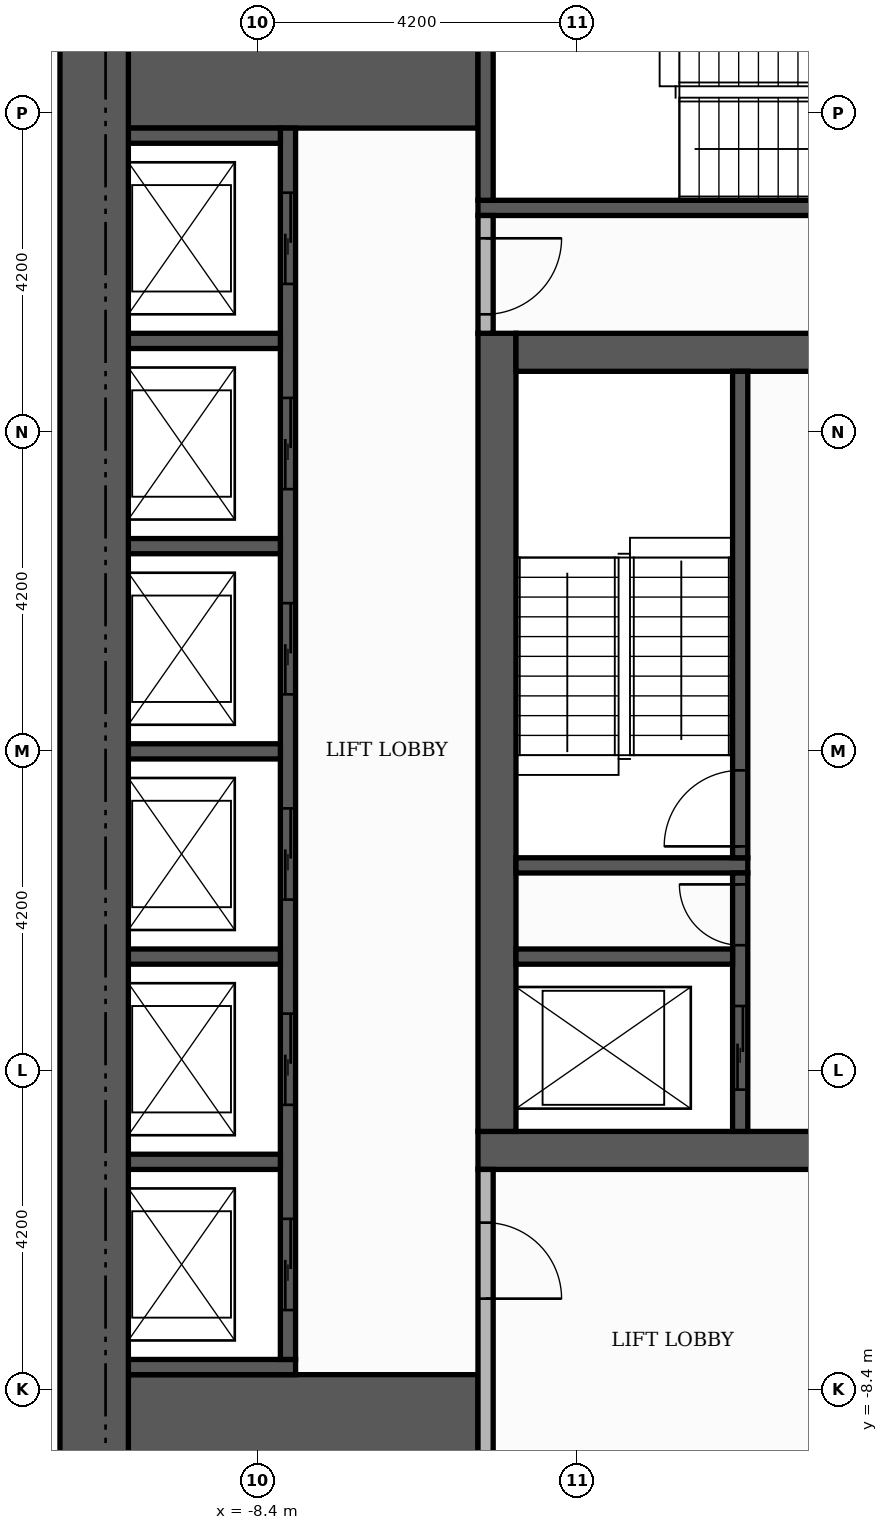
"""IFC4 building model, lengths in metres.
Left out: names, types, materials, properties, quantities, classifications, styles, units other than length and angle.
Written with IfcOpenShell. Run it as: python <this file> out.ifc"""

import sys

from ifc_helpers import new_model, si_unit, direction, frame, frame_2d, origin, place, context, subcontext, project, spatial, rectangle, extrude, element, fill, save


model = new_model("IFC4")
c1 = context("Model", 3, precision=1e-05, world=origin(), true_north=direction((0.0, 1.0)))
c2 = subcontext(c1, "Body", "Model", "MODEL_VIEW")
j1 = project(units=[si_unit("LENGTHUNIT", "METRE"), si_unit("PLANEANGLEUNIT", "RADIAN")], contexts=[c1])
p1 = place(None, origin())
s1 = spatial("IfcSite", under=j1, at=p1, CompositionType="ELEMENT")
p2 = place(p1, origin())
s2 = spatial("IfcBuilding", under=s1, at=p2, CompositionType="ELEMENT")
p3 = place(p2, frame((0.0, 0.0, 27.0)))
s3 = spatial("IfcBuildingStorey", under=s2, at=p3, CompositionType="ELEMENT", Elevation=27.0)
p4 = place(p3, frame((-5.5, -5.25, 0.0), z_axis=(0.0, 0.0, 1.0), x_axis=(1.0, 0.0, 0.0)))
e1 = element("IfcWall", 1, at=p4, inside=s3, PredefinedType="SHEAR", context=c2, shape_type="SweptSolid", body=[
    extrude(rectangle(XDim=11.0, YDim=0.5, at=frame_2d((5.5, 0.0))), origin(), (0.0, 0.0, 1.0), 3.48),
])
p5 = place(p4, frame((4.9, 0.0, 0.0)))
e2 = element("IfcOpeningElement", 2, at=p5, cuts=e1, PredefinedType="OPENING", context=c2, shape_type="SweptSolid", body=[
    extrude(rectangle(XDim=1.2, YDim=2.1, at=frame_2d((0.6, 1.05))), frame((0.0, 0.26, 0.0), z_axis=(0.0, -1.0, 0.0), x_axis=(1.0, 0.0, 0.0)), (0.0, 0.0, 1.0), 0.52),
])
p6 = place(p3, frame((-5.25, -5.0, 0.0), z_axis=(0.0, 0.0, 1.0), x_axis=(0.0, 1.0, 0.0)))
e3 = element("IfcWall", 3, at=p6, inside=s3, PredefinedType="SHEAR", context=c2, shape_type="SweptSolid", body=[
    extrude(rectangle(XDim=10.5, YDim=0.5, at=frame_2d((5.25, 0.0))), origin(), (0.0, 0.0, 1.0), 3.48),
])
p7 = place(p3, frame((-5.0, 5.25, 0.0), z_axis=(0.0, 0.0, 1.0), x_axis=(1.0, 0.0, 0.0)))
e4 = element("IfcWall", 4, at=p7, inside=s3, PredefinedType="SHEAR", context=c2, shape_type="SweptSolid", body=[
    extrude(rectangle(XDim=10.0, YDim=0.5, at=frame_2d((5.0, 0.0))), origin(), (0.0, 0.0, 1.0), 3.48),
])
p8 = place(p7, frame((4.4, 0.0, 0.0)))
e5 = element("IfcOpeningElement", 5, at=p8, cuts=e4, PredefinedType="OPENING", context=c2, shape_type="SweptSolid", body=[
    extrude(rectangle(XDim=1.2, YDim=2.1, at=frame_2d((0.6, 1.05))), frame((0.0, 0.26, 0.0), z_axis=(0.0, -1.0, 0.0), x_axis=(1.0, 0.0, 0.0)), (0.0, 0.0, 1.0), 0.52),
])
for number, where, z_axis, x_axis in (
    (6, (-10.1, -9.15, 0.0), (0.0, 0.0, 1.0), (1.0, 0.0, 0.0)),
    (7, (-10.1, 9.15, 0.0), (0.0, 0.0, 1.0), (1.0, 0.0, 0.0)),
):
    element("IfcWall", number, at=place(p3, frame(where, z_axis=z_axis, x_axis=x_axis)), inside=s3, PredefinedType="SHEAR", context=c2, shape_type="SweptSolid", body=[
        extrude(rectangle(XDim=4.6, YDim=1.9, at=frame_2d((2.3, 0.0))), origin(), (0.0, 0.0, 1.0), 3.48),
    ])
p9 = place(p3, frame((-5.0, -1.5, 0.0), z_axis=(0.0, 0.0, 1.0), x_axis=(1.0, 0.0, 0.0)))
e8 = element("IfcWall", 8, at=p9, inside=s3, PredefinedType="SHEAR", context=c2, shape_type="SweptSolid", body=[
    extrude(rectangle(XDim=3.05, YDim=0.2, at=frame_2d((1.525, 0.0))), origin(), (0.0, 0.0, 1.0), 3.48),
])
p10 = place(p3, frame((-2.05, -1.4, 0.0), z_axis=(0.0, 0.0, 1.0), x_axis=(0.0, 1.0, 0.0)))
e9 = element("IfcWall", 9, at=p10, inside=s3, PredefinedType="SHEAR", context=c2, shape_type="SweptSolid", body=[
    extrude(rectangle(XDim=6.4, YDim=0.2, at=frame_2d((3.2, 0.0))), origin(), (0.0, 0.0, 1.0), 3.48),
])
p11 = place(p10, frame((0.15, 0.0, 0.0)))
e10 = element("IfcOpeningElement", 10, at=p11, cuts=e9, PredefinedType="OPENING", context=c2, shape_type="SweptSolid", body=[
    extrude(rectangle(XDim=1.0, YDim=2.1, at=frame_2d((0.5, 1.05))), frame((0.0, 0.11, 0.0), z_axis=(0.0, -1.0, 0.0), x_axis=(1.0, 0.0, 0.0)), (0.0, 0.0, 1.0), 0.22),
])
p12 = place(p3, frame((-5.5, 7.15, 0.0), z_axis=(0.0, 0.0, 1.0), x_axis=(1.0, 0.0, 0.0)))
e11 = element("IfcWall", 11, at=p12, inside=s3, PredefinedType="SHEAR", context=c2, shape_type="SweptSolid", body=[
    extrude(rectangle(XDim=6.8, YDim=0.2, at=frame_2d((3.4, 0.0))), origin(), (0.0, 0.0, 1.0), 3.48),
])
p13 = place(p3, frame((-5.4, 7.25, 0.0), z_axis=(0.0, 0.0, 1.0), x_axis=(0.0, 1.0, 0.0)))
e12 = element("IfcWall", 12, at=p13, inside=s3, PredefinedType="SHEAR", context=c2, shape_type="SweptSolid", body=[
    extrude(rectangle(XDim=2.85, YDim=0.2, at=frame_2d((1.425, 0.0))), origin(), (0.0, 0.0, 1.0), 3.48),
])
p14 = place(p3, frame((-10.1, -8.1, 0.0), z_axis=(0.0, 0.0, 1.0), x_axis=(1.0, 0.0, 0.0)))
e13 = element("IfcWall", 13, at=p14, inside=s3, PredefinedType="SHEAR", context=c2, shape_type="SweptSolid", body=[
    extrude(rectangle(XDim=2.2, YDim=0.2, at=frame_2d((1.1, 0.0))), origin(), (0.0, 0.0, 1.0), 3.48),
])
p15 = place(p3, frame((-8.0, -8.0, 0.0), z_axis=(0.0, 0.0, 1.0), x_axis=(0.0, 1.0, 0.0)))
e14 = element("IfcWall", 14, at=p15, inside=s3, PredefinedType="SHEAR", context=c2, shape_type="SweptSolid", body=[
    extrude(rectangle(XDim=16.2, YDim=0.2, at=frame_2d((8.1, 0.0))), origin(), (0.0, 0.0, 1.0), 3.48),
])
p16 = place(p15, frame((0.65, 0.0, 0.0)))
e15 = element("IfcOpeningElement", 15, at=p16, cuts=e14, PredefinedType="OPENING", context=c2, shape_type="SweptSolid", body=[
    extrude(rectangle(XDim=1.2, YDim=2.1, at=frame_2d((0.6, 1.05))), frame((0.0, 0.11, 0.0), z_axis=(0.0, -1.0, 0.0), x_axis=(1.0, 0.0, 0.0)), (0.0, 0.0, 1.0), 0.22),
])
p17 = place(p15, frame((3.35, 0.0, 0.0)))
e16 = element("IfcOpeningElement", 16, at=p17, cuts=e14, PredefinedType="OPENING", context=c2, shape_type="SweptSolid", body=[
    extrude(rectangle(XDim=1.2, YDim=2.1, at=frame_2d((0.6, 1.05))), frame((0.0, 0.11, 0.0), z_axis=(0.0, -1.0, 0.0), x_axis=(1.0, 0.0, 0.0)), (0.0, 0.0, 1.0), 0.22),
])
p18 = place(p15, frame((6.05, 0.0, 0.0)))
e17 = element("IfcOpeningElement", 17, at=p18, cuts=e14, PredefinedType="OPENING", context=c2, shape_type="SweptSolid", body=[
    extrude(rectangle(XDim=1.2, YDim=2.1, at=frame_2d((0.6, 1.05))), frame((0.0, 0.11, 0.0), z_axis=(0.0, -1.0, 0.0), x_axis=(1.0, 0.0, 0.0)), (0.0, 0.0, 1.0), 0.22),
])
p19 = place(p15, frame((8.75, 0.0, 0.0)))
e18 = element("IfcOpeningElement", 18, at=p19, cuts=e14, PredefinedType="OPENING", context=c2, shape_type="SweptSolid", body=[
    extrude(rectangle(XDim=1.2, YDim=2.1, at=frame_2d((0.6, 1.05))), frame((0.0, 0.11, 0.0), z_axis=(0.0, -1.0, 0.0), x_axis=(1.0, 0.0, 0.0)), (0.0, 0.0, 1.0), 0.22),
])
p20 = place(p15, frame((11.45, 0.0, 0.0)))
e19 = element("IfcOpeningElement", 19, at=p20, cuts=e14, PredefinedType="OPENING", context=c2, shape_type="SweptSolid", body=[
    extrude(rectangle(XDim=1.2, YDim=2.1, at=frame_2d((0.6, 1.05))), frame((0.0, 0.11, 0.0), z_axis=(0.0, -1.0, 0.0), x_axis=(1.0, 0.0, 0.0)), (0.0, 0.0, 1.0), 0.22),
])
p21 = place(p15, frame((14.15, 0.0, 0.0)))
e20 = element("IfcOpeningElement", 20, at=p21, cuts=e14, PredefinedType="OPENING", context=c2, shape_type="SweptSolid", body=[
    extrude(rectangle(XDim=1.2, YDim=2.1, at=frame_2d((0.6, 1.05))), frame((0.0, 0.11, 0.0), z_axis=(0.0, -1.0, 0.0), x_axis=(1.0, 0.0, 0.0)), (0.0, 0.0, 1.0), 0.22),
])
p22 = place(p3, frame((-10.1, -5.4, 0.0), z_axis=(0.0, 0.0, 1.0), x_axis=(1.0, 0.0, 0.0)))
e21 = element("IfcWall", 21, at=p22, inside=s3, PredefinedType="SHEAR", context=c2, shape_type="SweptSolid", body=[
    extrude(rectangle(XDim=2.0, YDim=0.2, at=frame_2d((1.0, 0.0))), origin(), (0.0, 0.0, 1.0), 3.48),
])
p23 = place(p3, frame((-2.05, -5.0, 0.0), z_axis=(0.0, 0.0, 1.0), x_axis=(0.0, 1.0, 0.0)))
e22 = element("IfcWall", 22, at=p23, inside=s3, PredefinedType="SHEAR", context=c2, shape_type="SweptSolid", body=[
    extrude(rectangle(XDim=3.4, YDim=0.2, at=frame_2d((1.7, 0.0))), origin(), (0.0, 0.0, 1.0), 3.48),
])
p24 = place(p23, frame((0.55, 0.0, 0.0)))
e23 = element("IfcOpeningElement", 23, at=p24, cuts=e22, PredefinedType="OPENING", context=c2, shape_type="SweptSolid", body=[
    extrude(rectangle(XDim=1.1, YDim=2.1, at=frame_2d((0.55, 1.05))), frame((0.0, 0.11, 0.0), z_axis=(0.0, -1.0, 0.0), x_axis=(1.0, 0.0, 0.0)), (0.0, 0.0, 1.0), 0.22),
])
p25 = place(p23, frame((2.45, 0.0, 0.0)))
e24 = element("IfcOpeningElement", 24, at=p25, cuts=e22, PredefinedType="OPENING", context=c2, shape_type="SweptSolid", body=[
    extrude(rectangle(XDim=0.8, YDim=2.1, at=frame_2d((0.4, 1.05))), frame((0.0, 0.11, 0.0), z_axis=(0.0, -1.0, 0.0), x_axis=(1.0, 0.0, 0.0)), (0.0, 0.0, 1.0), 0.22),
])
p26 = place(p3, frame((-10.1, -2.7, 0.0), z_axis=(0.0, 0.0, 1.0), x_axis=(1.0, 0.0, 0.0)))
e25 = element("IfcWall", 25, at=p26, inside=s3, PredefinedType="SHEAR", context=c2, shape_type="SweptSolid", body=[
    extrude(rectangle(XDim=2.0, YDim=0.2, at=frame_2d((1.0, 0.0))), origin(), (0.0, 0.0, 1.0), 3.48),
])
p27 = place(p3, frame((-5.0, -2.7, 0.0), z_axis=(0.0, 0.0, 1.0), x_axis=(1.0, 0.0, 0.0)))
e26 = element("IfcWall", 26, at=p27, inside=s3, PredefinedType="SHEAR", context=c2, shape_type="SweptSolid", body=[
    extrude(rectangle(XDim=2.85, YDim=0.2, at=frame_2d((1.425, 0.0))), origin(), (0.0, 0.0, 1.0), 3.48),
])
for number, where, z_axis, x_axis in (
    (27, (-10.1, 0.0, 0.0), (0.0, 0.0, 1.0), (1.0, 0.0, 0.0)),
    (28, (-10.1, 2.7, 0.0), (0.0, 0.0, 1.0), (1.0, 0.0, 0.0)),
    (29, (-10.1, 5.4, 0.0), (0.0, 0.0, 1.0), (1.0, 0.0, 0.0)),
    (30, (-10.1, 8.1, 0.0), (0.0, 0.0, 1.0), (1.0, 0.0, 0.0)),
):
    element("IfcWall", number, at=place(p3, frame(where, z_axis=z_axis, x_axis=x_axis)), inside=s3, PredefinedType="SHEAR", context=c2, shape_type="SweptSolid", body=[
        extrude(rectangle(XDim=2.0, YDim=0.2, at=frame_2d((1.0, 0.0))), origin(), (0.0, 0.0, 1.0), 3.48),
    ])
p28 = place(p3, frame((-10.55, -10.1, 0.0), z_axis=(0.0, 0.0, 1.0), x_axis=(0.0, 1.0, 0.0)))
e31 = element("IfcWall", 31, at=p28, inside=s3, PredefinedType="SHEAR", context=c2, shape_type="SweptSolid", body=[
    extrude(rectangle(XDim=20.2, YDim=0.9, at=frame_2d((10.1, 0.0))), origin(), (0.0, 0.0, 1.0), 3.48),
])
p29 = place(p3, frame((-5.4, -10.1, 0.0), z_axis=(0.0, 0.0, 1.0), x_axis=(0.0, 1.0, 0.0)))
e32 = element("IfcWall", 32, at=p29, inside=s3, PredefinedType="PARTITIONING", context=c2, shape_type="SweptSolid", body=[
    extrude(rectangle(XDim=4.6, YDim=0.2, at=frame_2d((2.3, 0.0))), origin(), (0.0, 0.0, 1.0), 3.48),
])
p30 = place(p29, frame((2.9, 0.0, 0.0)))
e33 = element("IfcOpeningElement", 33, at=p30, cuts=e32, PredefinedType="OPENING", context=c2, shape_type="SweptSolid", body=[
    extrude(rectangle(XDim=1.0, YDim=2.1, at=frame_2d((0.5, 1.05))), frame((0.0, 0.11, 0.0), z_axis=(0.0, -1.0, 0.0), x_axis=(1.0, 0.0, 0.0)), (0.0, 0.0, 1.0), 0.22),
])
p31 = place(p3, frame((-5.4, 5.5, 0.0), z_axis=(0.0, 0.0, 1.0), x_axis=(0.0, 1.0, 0.0)))
e34 = element("IfcWall", 34, at=p31, inside=s3, PredefinedType="PARTITIONING", context=c2, shape_type="SweptSolid", body=[
    extrude(rectangle(XDim=1.55, YDim=0.2, at=frame_2d((0.775, 0.0))), origin(), (0.0, 0.0, 1.0), 3.48),
])
p32 = place(p31, frame((0.25, 0.0, 0.0)))
e35 = element("IfcOpeningElement", 35, at=p32, cuts=e34, PredefinedType="OPENING", context=c2, shape_type="SweptSolid", body=[
    extrude(rectangle(XDim=1.0, YDim=2.1, at=frame_2d((0.5, 1.05))), frame((0.0, 0.11, 0.0), z_axis=(0.0, -1.0, 0.0), x_axis=(1.0, 0.0, 0.0)), (0.0, 0.0, 1.0), 0.22),
])
p33 = place(p16, origin())
e36 = element("IfcDoor", 36, at=p33, inside=s3, OperationType="SLIDING_TO_LEFT", PredefinedType="DOOR", context=c2, shape_type="SweptSolid", body=[
    extrude(rectangle(XDim=1.2, YDim=2.1, at=frame_2d((0.6, 1.05))), frame((0.0, 0.025, 0.0), z_axis=(0.0, -1.0, 0.0), x_axis=(1.0, 0.0, 0.0)), (0.0, 0.0, 1.0), 0.05),
])
fill(e15, e36)
p34 = place(p17, origin())
e37 = element("IfcDoor", 37, at=p34, inside=s3, OperationType="SLIDING_TO_LEFT", PredefinedType="DOOR", context=c2, shape_type="SweptSolid", body=[
    extrude(rectangle(XDim=1.2, YDim=2.1, at=frame_2d((0.6, 1.05))), frame((0.0, 0.025, 0.0), z_axis=(0.0, -1.0, 0.0), x_axis=(1.0, 0.0, 0.0)), (0.0, 0.0, 1.0), 0.05),
])
fill(e16, e37)
p35 = place(p18, origin())
e38 = element("IfcDoor", 38, at=p35, inside=s3, OperationType="SLIDING_TO_LEFT", PredefinedType="DOOR", context=c2, shape_type="SweptSolid", body=[
    extrude(rectangle(XDim=1.2, YDim=2.1, at=frame_2d((0.6, 1.05))), frame((0.0, 0.025, 0.0), z_axis=(0.0, -1.0, 0.0), x_axis=(1.0, 0.0, 0.0)), (0.0, 0.0, 1.0), 0.05),
])
fill(e17, e38)
p36 = place(p19, origin())
e39 = element("IfcDoor", 39, at=p36, inside=s3, OperationType="SLIDING_TO_LEFT", PredefinedType="DOOR", context=c2, shape_type="SweptSolid", body=[
    extrude(rectangle(XDim=1.2, YDim=2.1, at=frame_2d((0.6, 1.05))), frame((0.0, 0.025, 0.0), z_axis=(0.0, -1.0, 0.0), x_axis=(1.0, 0.0, 0.0)), (0.0, 0.0, 1.0), 0.05),
])
fill(e18, e39)
p37 = place(p20, origin())
e40 = element("IfcDoor", 40, at=p37, inside=s3, OperationType="SLIDING_TO_LEFT", PredefinedType="DOOR", context=c2, shape_type="SweptSolid", body=[
    extrude(rectangle(XDim=1.2, YDim=2.1, at=frame_2d((0.6, 1.05))), frame((0.0, 0.025, 0.0), z_axis=(0.0, -1.0, 0.0), x_axis=(1.0, 0.0, 0.0)), (0.0, 0.0, 1.0), 0.05),
])
fill(e19, e40)
p38 = place(p21, origin())
e41 = element("IfcDoor", 41, at=p38, inside=s3, OperationType="SLIDING_TO_LEFT", PredefinedType="DOOR", context=c2, shape_type="SweptSolid", body=[
    extrude(rectangle(XDim=1.2, YDim=2.1, at=frame_2d((0.6, 1.05))), frame((0.0, 0.025, 0.0), z_axis=(0.0, -1.0, 0.0), x_axis=(1.0, 0.0, 0.0)), (0.0, 0.0, 1.0), 0.05),
])
fill(e20, e41)
p39 = place(p24, origin())
e42 = element("IfcDoor", 42, at=p39, inside=s3, OperationType="SLIDING_TO_LEFT", PredefinedType="DOOR", context=c2, shape_type="SweptSolid", body=[
    extrude(rectangle(XDim=1.1, YDim=2.1, at=frame_2d((0.55, 1.05))), frame((0.0, 0.025, 0.0), z_axis=(0.0, -1.0, 0.0), x_axis=(1.0, 0.0, 0.0)), (0.0, 0.0, 1.0), 0.05),
])
fill(e23, e42)
p40 = place(p11, origin())
e43 = element("IfcDoor", 43, at=p40, inside=s3, OperationType="SINGLE_SWING_LEFT", PredefinedType="DOOR", context=c2, shape_type="SweptSolid", body=[
    extrude(rectangle(XDim=1.0, YDim=2.1, at=frame_2d((0.5, 1.05))), frame((0.0, 0.025, 0.0), z_axis=(0.0, -1.0, 0.0), x_axis=(1.0, 0.0, 0.0)), (0.0, 0.0, 1.0), 0.05),
])
fill(e10, e43)
p41 = place(p25, origin())
e44 = element("IfcDoor", 44, at=p41, inside=s3, OperationType="SINGLE_SWING_RIGHT", PredefinedType="DOOR", context=c2, shape_type="SweptSolid", body=[
    extrude(rectangle(XDim=0.8, YDim=2.1, at=frame_2d((0.4, 1.05))), frame((0.0, 0.025, 0.0), z_axis=(0.0, -1.0, 0.0), x_axis=(1.0, 0.0, 0.0)), (0.0, 0.0, 1.0), 0.05),
])
fill(e24, e44)
p42 = place(p32, frame((1.0, 0.0, 0.0), z_axis=(0.0, 0.0, 1.0), x_axis=(-1.0, 0.0, 0.0)))
e45 = element("IfcDoor", 45, at=p42, inside=s3, OperationType="SINGLE_SWING_RIGHT", PredefinedType="DOOR", context=c2, shape_type="SweptSolid", body=[
    extrude(rectangle(XDim=1.0, YDim=2.1, at=frame_2d((0.5, 1.05))), frame((0.0, 0.025, 0.0), z_axis=(0.0, -1.0, 0.0), x_axis=(1.0, 0.0, 0.0)), (0.0, 0.0, 1.0), 0.05),
])
fill(e35, e45)
p43 = place(p30, frame((1.0, 0.0, 0.0), z_axis=(0.0, 0.0, 1.0), x_axis=(-1.0, 0.0, 0.0)))
e46 = element("IfcDoor", 46, at=p43, inside=s3, OperationType="SINGLE_SWING_LEFT", PredefinedType="DOOR", context=c2, shape_type="SweptSolid", body=[
    extrude(rectangle(XDim=1.0, YDim=2.1, at=frame_2d((0.5, 1.05))), frame((0.0, 0.025, 0.0), z_axis=(0.0, -1.0, 0.0), x_axis=(1.0, 0.0, 0.0)), (0.0, 0.0, 1.0), 0.05),
])
fill(e33, e46)
save(model, sys.argv[1])
